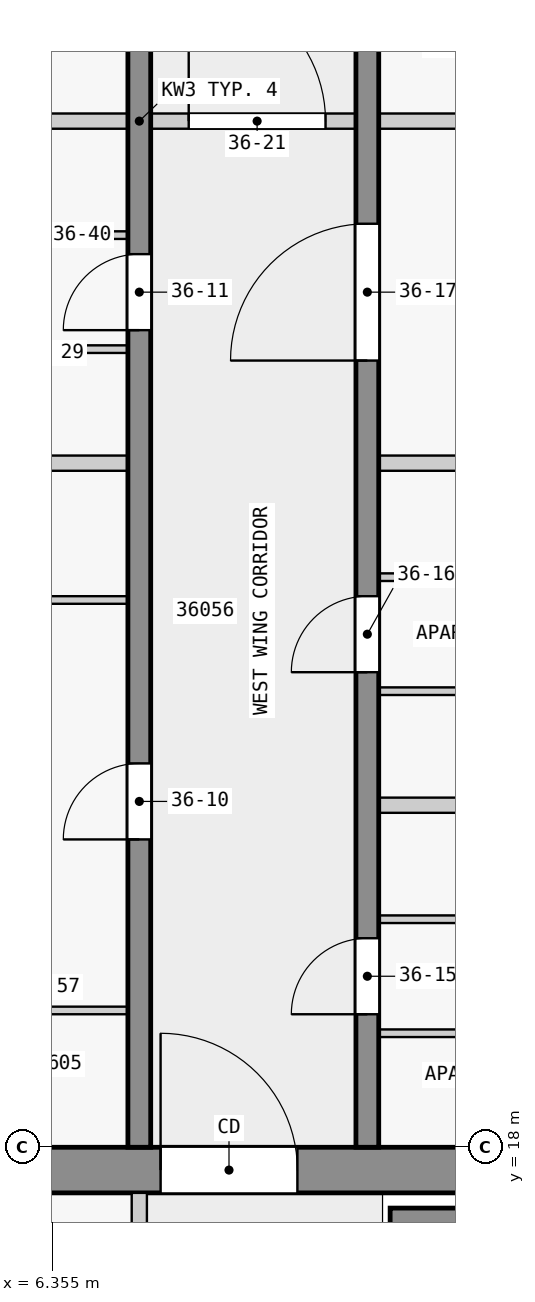
"""IFC4 building model, lengths in metres.
Left out: names, types, materials, properties, quantities, classifications, styles, units other than length and angle.
Written with IfcOpenShell. Run it as: python <this file> out.ifc"""

import sys

from ifc_helpers import new_model, si_unit, direction, frame, frame_2d, origin, place, context, subcontext, project, spatial, rectangle, extrude, element, fill, save


model = new_model("IFC4")
c1 = context("Model", 3, precision=1e-05, world=origin(), true_north=direction((0.0, 1.0)))
c2 = subcontext(c1, "Body", "Model", "MODEL_VIEW")
j1 = project(units=[si_unit("LENGTHUNIT", "METRE"), si_unit("PLANEANGLEUNIT", "RADIAN")], contexts=[c1])
p1 = place(None, origin())
s1 = spatial("IfcSite", under=j1, at=p1, CompositionType="ELEMENT")
p2 = place(p1, origin())
s2 = spatial("IfcBuilding", under=s1, at=p2, CompositionType="ELEMENT")
p3 = place(p2, frame((0.0, 0.0, 142.9)))
s3 = spatial("IfcBuildingStorey", under=s2, at=p3, CompositionType="ELEMENT", Elevation=142.9)
p4 = place(p3, frame((1.38, 17.7, 0.0), z_axis=(0.0, 0.0, 1.0), x_axis=(1.0, 0.0, 0.0)))
e1 = element("IfcWall", 1, at=p4, inside=s3, PredefinedType="SHEAR", context=c2, shape_type="SweptSolid", body=[
    extrude(rectangle(XDim=21.12, YDim=0.6, at=frame_2d((10.56, 0.0))), origin(), (0.0, 0.0, 1.0), 3.25),
])
p5 = place(p4, frame((6.4, 0.0, 0.0)))
e2 = element("IfcOpeningElement", 2, at=p5, cuts=e1, PredefinedType="OPENING", context=c2, shape_type="SweptSolid", body=[
    extrude(rectangle(XDim=1.8, YDim=2.1, at=frame_2d((0.9, 1.05))), frame((0.0, 0.31, 0.0), z_axis=(0.0, -1.0, 0.0), x_axis=(1.0, 0.0, 0.0)), (0.0, 0.0, 1.0), 0.62),
])
p6 = place(p3, frame((10.8, 17.05, 0.0), z_axis=(0.0, 0.0, 1.0), x_axis=(1.0, 0.0, 0.0)))
e3 = element("IfcWall", 3, at=p6, inside=s3, PredefinedType="SHEAR", context=c2, shape_type="SweptSolid", body=[
    extrude(rectangle(XDim=7.8, YDim=0.3, at=frame_2d((3.9, 0.0))), origin(), (0.0, 0.0, 1.0), 3.25),
])
p7 = place(p3, frame((7.5, 18.0, 0.0), z_axis=(0.0, 0.0, 1.0), x_axis=(0.0, 1.0, 0.0)))
e4 = element("IfcWall", 4, at=p7, inside=s3, PredefinedType="SHEAR", context=c2, shape_type="SweptSolid", body=[
    extrude(rectangle(XDim=27.0, YDim=0.3, at=frame_2d((13.5, 0.0))), origin(), (0.0, 0.0, 1.0), 3.25),
])
p8 = place(p7, frame((4.05, 0.0, 0.0)))
e5 = element("IfcOpeningElement", 5, at=p8, cuts=e4, PredefinedType="OPENING", context=c2, shape_type="SweptSolid", body=[
    extrude(rectangle(XDim=1.0, YDim=2.1, at=frame_2d((0.5, 1.05))), frame((0.0, 0.16, 0.0), z_axis=(0.0, -1.0, 0.0), x_axis=(1.0, 0.0, 0.0)), (0.0, 0.0, 1.0), 0.32),
])
p9 = place(p7, frame((10.75, 0.0, 0.0)))
e6 = element("IfcOpeningElement", 6, at=p9, cuts=e4, PredefinedType="OPENING", context=c2, shape_type="SweptSolid", body=[
    extrude(rectangle(XDim=1.0, YDim=2.1, at=frame_2d((0.5, 1.05))), frame((0.0, 0.16, 0.0), z_axis=(0.0, -1.0, 0.0), x_axis=(1.0, 0.0, 0.0)), (0.0, 0.0, 1.0), 0.32),
])
p10 = place(p7, frame((17.55, 0.0, 0.0)))
e7 = element("IfcOpeningElement", 7, at=p10, cuts=e4, PredefinedType="OPENING", context=c2, shape_type="SweptSolid", body=[
    extrude(rectangle(XDim=1.0, YDim=2.1, at=frame_2d((0.5, 1.05))), frame((0.0, 0.16, 0.0), z_axis=(0.0, -1.0, 0.0), x_axis=(1.0, 0.0, 0.0)), (0.0, 0.0, 1.0), 0.32),
])
p11 = place(p7, frame((23.25, 0.0, 0.0)))
e8 = element("IfcOpeningElement", 8, at=p11, cuts=e4, PredefinedType="OPENING", context=c2, shape_type="SweptSolid", body=[
    extrude(rectangle(XDim=0.9, YDim=2.1, at=frame_2d((0.45, 1.05))), frame((0.0, 0.16, 0.0), z_axis=(0.0, -1.0, 0.0), x_axis=(1.0, 0.0, 0.0)), (0.0, 0.0, 1.0), 0.32),
])
p12 = place(p7, frame((25.45, 0.0, 0.0)))
e9 = element("IfcOpeningElement", 9, at=p12, cuts=e4, PredefinedType="OPENING", context=c2, shape_type="SweptSolid", body=[
    extrude(rectangle(XDim=1.0, YDim=2.1, at=frame_2d((0.5, 1.05))), frame((0.0, 0.16, 0.0), z_axis=(0.0, -1.0, 0.0), x_axis=(1.0, 0.0, 0.0)), (0.0, 0.0, 1.0), 0.32),
])
p13 = place(p3, frame((10.5, 18.0, 0.0), z_axis=(0.0, 0.0, 1.0), x_axis=(0.0, 1.0, 0.0)))
e10 = element("IfcWall", 10, at=p13, inside=s3, PredefinedType="SHEAR", context=c2, shape_type="SweptSolid", body=[
    extrude(rectangle(XDim=27.0, YDim=0.3, at=frame_2d((13.5, 0.0))), origin(), (0.0, 0.0, 1.0), 3.25),
])
p14 = place(p13, frame((1.75, 0.0, 0.0)))
e11 = element("IfcOpeningElement", 11, at=p14, cuts=e10, PredefinedType="OPENING", context=c2, shape_type="SweptSolid", body=[
    extrude(rectangle(XDim=1.0, YDim=2.1, at=frame_2d((0.5, 1.05))), frame((0.0, 0.16, 0.0), z_axis=(0.0, -1.0, 0.0), x_axis=(1.0, 0.0, 0.0)), (0.0, 0.0, 1.0), 0.32),
])
p15 = place(p13, frame((6.25, 0.0, 0.0)))
e12 = element("IfcOpeningElement", 12, at=p15, cuts=e10, PredefinedType="OPENING", context=c2, shape_type="SweptSolid", body=[
    extrude(rectangle(XDim=1.0, YDim=2.1, at=frame_2d((0.5, 1.05))), frame((0.0, 0.16, 0.0), z_axis=(0.0, -1.0, 0.0), x_axis=(1.0, 0.0, 0.0)), (0.0, 0.0, 1.0), 0.32),
])
p16 = place(p13, frame((10.35, 0.0, 0.0)))
e13 = element("IfcOpeningElement", 13, at=p16, cuts=e10, PredefinedType="OPENING", context=c2, shape_type="SweptSolid", body=[
    extrude(rectangle(XDim=1.8, YDim=2.1, at=frame_2d((0.9, 1.05))), frame((0.0, 0.16, 0.0), z_axis=(0.0, -1.0, 0.0), x_axis=(1.0, 0.0, 0.0)), (0.0, 0.0, 1.0), 0.32),
])
p17 = place(p13, frame((15.25, 0.0, 0.0)))
e14 = element("IfcOpeningElement", 14, at=p17, cuts=e10, PredefinedType="OPENING", context=c2, shape_type="SweptSolid", body=[
    extrude(rectangle(XDim=1.0, YDim=2.1, at=frame_2d((0.5, 1.05))), frame((0.0, 0.16, 0.0), z_axis=(0.0, -1.0, 0.0), x_axis=(1.0, 0.0, 0.0)), (0.0, 0.0, 1.0), 0.32),
])
p18 = place(p13, frame((21.35, 0.0, 0.0)))
e15 = element("IfcOpeningElement", 15, at=p18, cuts=e10, PredefinedType="OPENING", context=c2, shape_type="SweptSolid", body=[
    extrude(rectangle(XDim=1.0, YDim=2.1, at=frame_2d((0.5, 1.05))), frame((0.0, 0.16, 0.0), z_axis=(0.0, -1.0, 0.0), x_axis=(1.0, 0.0, 0.0)), (0.0, 0.0, 1.0), 0.32),
])
p19 = place(p3, frame((7.5, 10.1, 0.0), z_axis=(0.0, 0.0, 1.0), x_axis=(0.0, 1.0, 0.0)))
e16 = element("IfcWall", 16, at=p19, inside=s3, PredefinedType="PARTITIONING", context=c2, shape_type="SweptSolid", body=[
    extrude(rectangle(XDim=7.3, YDim=0.2, at=frame_2d((3.65, 0.0))), origin(), (0.0, 0.0, 1.0), 3.25),
])
p20 = place(p19, frame((0.75, 0.0, 0.0)))
e17 = element("IfcOpeningElement", 17, at=p20, cuts=e16, PredefinedType="OPENING", context=c2, shape_type="SweptSolid", body=[
    extrude(rectangle(XDim=0.9, YDim=2.1, at=frame_2d((0.45, 1.05))), frame((0.0, 0.11, 0.0), z_axis=(0.0, -1.0, 0.0), x_axis=(1.0, 0.0, 0.0)), (0.0, 0.0, 1.0), 0.22),
])
p21 = place(p19, frame((4.4, 0.0, 0.0)))
e18 = element("IfcOpeningElement", 18, at=p21, cuts=e16, PredefinedType="OPENING", context=c2, shape_type="SweptSolid", body=[
    extrude(rectangle(XDim=0.9, YDim=2.1, at=frame_2d((0.45, 1.05))), frame((0.0, 0.11, 0.0), z_axis=(0.0, -1.0, 0.0), x_axis=(1.0, 0.0, 0.0)), (0.0, 0.0, 1.0), 0.22),
])
p22 = place(p3, frame((14.05, 19.5, 0.0), z_axis=(0.0, 0.0, 1.0), x_axis=(-1.0, 0.0, 0.0)))
e19 = element("IfcWall", 19, at=p22, inside=s3, PredefinedType="PARTITIONING", context=c2, shape_type="SweptSolid", body=[
    extrude(rectangle(XDim=3.4, YDim=0.1, at=frame_2d((1.7, 0.0))), origin(), (0.0, 0.0, 1.0), 3.25),
])
p23 = place(p22, frame((1.25, 0.0, 0.0)))
e20 = element("IfcOpeningElement", 20, at=p23, cuts=e19, PredefinedType="OPENING", context=c2, shape_type="SweptSolid", body=[
    extrude(rectangle(XDim=0.9, YDim=2.1, at=frame_2d((0.45, 1.05))), frame((0.0, 0.06, 0.0), z_axis=(0.0, -1.0, 0.0), x_axis=(1.0, 0.0, 0.0)), (0.0, 0.0, 1.0), 0.12),
])
p24 = place(p3, frame((7.35, 19.8, 0.0), z_axis=(0.0, 0.0, 1.0), x_axis=(-1.0, 0.0, 0.0)))
e21 = element("IfcWall", 21, at=p24, inside=s3, PredefinedType="PARTITIONING", context=c2, shape_type="SweptSolid", body=[
    extrude(rectangle(XDim=3.4, YDim=0.1, at=frame_2d((1.7, 0.0))), origin(), (0.0, 0.0, 1.0), 3.25),
])
p25 = place(p24, frame((1.25, 0.0, 0.0)))
e22 = element("IfcOpeningElement", 22, at=p25, cuts=e21, PredefinedType="OPENING", context=c2, shape_type="SweptSolid", body=[
    extrude(rectangle(XDim=0.9, YDim=2.1, at=frame_2d((0.45, 1.05))), frame((0.0, 0.06, 0.0), z_axis=(0.0, -1.0, 0.0), x_axis=(1.0, 0.0, 0.0)), (0.0, 0.0, 1.0), 0.12),
])
p26 = place(p3, frame((10.65, 21.0, 0.0), z_axis=(0.0, 0.0, 1.0), x_axis=(1.0, 0.0, 0.0)))
e23 = element("IfcWall", 23, at=p26, inside=s3, PredefinedType="PARTITIONING", context=c2, shape_type="SweptSolid", body=[
    extrude(rectangle(XDim=3.4, YDim=0.1, at=frame_2d((1.7, 0.0))), origin(), (0.0, 0.0, 1.0), 3.25),
])
p27 = place(p26, frame((1.25, 0.0, 0.0)))
e24 = element("IfcOpeningElement", 24, at=p27, cuts=e23, PredefinedType="OPENING", context=c2, shape_type="SweptSolid", body=[
    extrude(rectangle(XDim=0.9, YDim=2.1, at=frame_2d((0.45, 1.05))), frame((0.0, 0.06, 0.0), z_axis=(0.0, -1.0, 0.0), x_axis=(1.0, 0.0, 0.0)), (0.0, 0.0, 1.0), 0.12),
])
p28 = place(p3, frame((13.95, 22.5, 0.0), z_axis=(0.0, 0.0, 1.0), x_axis=(-1.0, 0.0, 0.0)))
e25 = element("IfcWall", 25, at=p28, inside=s3, PredefinedType="PARTITIONING", context=c2, shape_type="SweptSolid", body=[
    extrude(rectangle(XDim=3.3, YDim=0.2, at=frame_2d((1.65, 0.0))), origin(), (0.0, 0.0, 1.0), 3.25),
])
p29 = place(p3, frame((14.05, 24.0, 0.0), z_axis=(0.0, 0.0, 1.0), x_axis=(-1.0, 0.0, 0.0)))
e26 = element("IfcWall", 26, at=p29, inside=s3, PredefinedType="PARTITIONING", context=c2, shape_type="SweptSolid", body=[
    extrude(rectangle(XDim=3.4, YDim=0.1, at=frame_2d((1.7, 0.0))), origin(), (0.0, 0.0, 1.0), 3.25),
])
p30 = place(p29, frame((1.25, 0.0, 0.0)))
e27 = element("IfcOpeningElement", 27, at=p30, cuts=e26, PredefinedType="OPENING", context=c2, shape_type="SweptSolid", body=[
    extrude(rectangle(XDim=0.9, YDim=2.1, at=frame_2d((0.45, 1.05))), frame((0.0, 0.06, 0.0), z_axis=(0.0, -1.0, 0.0), x_axis=(1.0, 0.0, 0.0)), (0.0, 0.0, 1.0), 0.12),
])
p31 = place(p3, frame((3.95, 25.2, 0.0), z_axis=(0.0, 0.0, 1.0), x_axis=(1.0, 0.0, 0.0)))
e28 = element("IfcWall", 28, at=p31, inside=s3, PredefinedType="PARTITIONING", context=c2, shape_type="SweptSolid", body=[
    extrude(rectangle(XDim=3.4, YDim=0.1, at=frame_2d((1.7, 0.0))), origin(), (0.0, 0.0, 1.0), 3.25),
])
p32 = place(p31, frame((1.25, 0.0, 0.0)))
e29 = element("IfcOpeningElement", 29, at=p32, cuts=e28, PredefinedType="OPENING", context=c2, shape_type="SweptSolid", body=[
    extrude(rectangle(XDim=0.9, YDim=2.1, at=frame_2d((0.45, 1.05))), frame((0.0, 0.06, 0.0), z_axis=(0.0, -1.0, 0.0), x_axis=(1.0, 0.0, 0.0)), (0.0, 0.0, 1.0), 0.12),
])
p33 = place(p3, frame((10.65, 25.5, 0.0), z_axis=(0.0, 0.0, 1.0), x_axis=(1.0, 0.0, 0.0)))
e30 = element("IfcWall", 30, at=p33, inside=s3, PredefinedType="PARTITIONING", context=c2, shape_type="SweptSolid", body=[
    extrude(rectangle(XDim=3.4, YDim=0.1, at=frame_2d((1.7, 0.0))), origin(), (0.0, 0.0, 1.0), 3.25),
])
p34 = place(p33, frame((1.25, 0.0, 0.0)))
e31 = element("IfcOpeningElement", 31, at=p34, cuts=e30, PredefinedType="OPENING", context=c2, shape_type="SweptSolid", body=[
    extrude(rectangle(XDim=0.9, YDim=2.1, at=frame_2d((0.45, 1.05))), frame((0.0, 0.06, 0.0), z_axis=(0.0, -1.0, 0.0), x_axis=(1.0, 0.0, 0.0)), (0.0, 0.0, 1.0), 0.12),
])
for number, where, z_axis, x_axis in (
    (32, (7.35, 27.0, 0.0), (0.0, 0.0, 1.0), (-1.0, 0.0, 0.0)),
    (33, (13.95, 27.0, 0.0), (0.0, 0.0, 1.0), (-1.0, 0.0, 0.0)),
):
    element("IfcWall", number, at=place(p3, frame(where, z_axis=z_axis, x_axis=x_axis)), inside=s3, PredefinedType="PARTITIONING", context=c2, shape_type="SweptSolid", body=[
        extrude(rectangle(XDim=3.3, YDim=0.2, at=frame_2d((1.65, 0.0))), origin(), (0.0, 0.0, 1.0), 3.25),
    ])
p35 = place(p3, frame((7.35, 28.5, 0.0), z_axis=(0.0, 0.0, 1.0), x_axis=(-1.0, 0.0, 0.0)))
e34 = element("IfcWall", 34, at=p35, inside=s3, PredefinedType="PARTITIONING", context=c2, shape_type="SweptSolid", body=[
    extrude(rectangle(XDim=3.4, YDim=0.1, at=frame_2d((1.7, 0.0))), origin(), (0.0, 0.0, 1.0), 3.25),
])
p36 = place(p35, frame((1.25, 0.0, 0.0)))
e35 = element("IfcOpeningElement", 35, at=p36, cuts=e34, PredefinedType="OPENING", context=c2, shape_type="SweptSolid", body=[
    extrude(rectangle(XDim=0.9, YDim=2.1, at=frame_2d((0.45, 1.05))), frame((0.0, 0.06, 0.0), z_axis=(0.0, -1.0, 0.0), x_axis=(1.0, 0.0, 0.0)), (0.0, 0.0, 1.0), 0.12),
])
p37 = place(p3, frame((3.95, 30.0, 0.0), z_axis=(0.0, 0.0, 1.0), x_axis=(1.0, 0.0, 0.0)))
e36 = element("IfcWall", 36, at=p37, inside=s3, PredefinedType="PARTITIONING", context=c2, shape_type="SweptSolid", body=[
    extrude(rectangle(XDim=3.4, YDim=0.1, at=frame_2d((1.7, 0.0))), origin(), (0.0, 0.0, 1.0), 3.25),
])
p38 = place(p37, frame((1.25, 0.0, 0.0)))
e37 = element("IfcOpeningElement", 37, at=p38, cuts=e36, PredefinedType="OPENING", context=c2, shape_type="SweptSolid", body=[
    extrude(rectangle(XDim=0.9, YDim=2.1, at=frame_2d((0.45, 1.05))), frame((0.0, 0.06, 0.0), z_axis=(0.0, -1.0, 0.0), x_axis=(1.0, 0.0, 0.0)), (0.0, 0.0, 1.0), 0.12),
])
p39 = place(p3, frame((7.35, 31.5, 0.0), z_axis=(0.0, 0.0, 1.0), x_axis=(-1.0, 0.0, 0.0)))
e38 = element("IfcWall", 38, at=p39, inside=s3, PredefinedType="PARTITIONING", context=c2, shape_type="SweptSolid", body=[
    extrude(rectangle(XDim=3.3, YDim=0.2, at=frame_2d((1.65, 0.0))), origin(), (0.0, 0.0, 1.0), 3.25),
])
p40 = place(p3, frame((17.85, 31.5, 0.0), z_axis=(0.0, 0.0, 1.0), x_axis=(-1.0, 0.0, 0.0)))
e39 = element("IfcWall", 39, at=p40, inside=s3, PredefinedType="PARTITIONING", context=c2, shape_type="SweptSolid", body=[
    extrude(rectangle(XDim=7.2, YDim=0.2, at=frame_2d((3.6, 0.0))), origin(), (0.0, 0.0, 1.0), 3.25),
])
p41 = place(p3, frame((7.45, 31.5, 0.0), z_axis=(0.0, 0.0, 1.0), x_axis=(1.0, 0.0, 0.0)))
e40 = element("IfcWall", 40, at=p41, inside=s3, PredefinedType="PARTITIONING", context=c2, shape_type="SweptSolid", body=[
    extrude(rectangle(XDim=3.1, YDim=0.2, at=frame_2d((1.55, 0.0))), origin(), (0.0, 0.0, 1.0), 3.25),
])
p42 = place(p41, frame((0.7, 0.0, 0.0)))
e41 = element("IfcOpeningElement", 41, at=p42, cuts=e40, PredefinedType="OPENING", context=c2, shape_type="SweptSolid", body=[
    extrude(rectangle(XDim=1.8, YDim=2.1, at=frame_2d((0.9, 1.05))), frame((0.0, 0.11, 0.0), z_axis=(0.0, -1.0, 0.0), x_axis=(1.0, 0.0, 0.0)), (0.0, 0.0, 1.0), 0.22),
])
p43 = place(p5, origin())
e42 = element("IfcDoor", 42, at=p43, inside=s3, OperationType="DOUBLE_DOOR_SINGLE_SWING", PredefinedType="DOOR", context=c2, shape_type="SweptSolid", body=[
    extrude(rectangle(XDim=1.8, YDim=2.1, at=frame_2d((0.9, 1.05))), frame((0.0, 0.025, 0.0), z_axis=(0.0, -1.0, 0.0), x_axis=(1.0, 0.0, 0.0)), (0.0, 0.0, 1.0), 0.05),
])
fill(e2, e42)
p44 = place(p8, origin())
e43 = element("IfcDoor", 43, at=p44, inside=s3, OperationType="SINGLE_SWING_LEFT", PredefinedType="DOOR", context=c2, shape_type="SweptSolid", body=[
    extrude(rectangle(XDim=1.0, YDim=2.1, at=frame_2d((0.5, 1.05))), frame((0.0, 0.025, 0.0), z_axis=(0.0, -1.0, 0.0), x_axis=(1.0, 0.0, 0.0)), (0.0, 0.0, 1.0), 0.05),
])
fill(e5, e43)
p45 = place(p9, origin())
e44 = element("IfcDoor", 44, at=p45, inside=s3, OperationType="SINGLE_SWING_LEFT", PredefinedType="DOOR", context=c2, shape_type="SweptSolid", body=[
    extrude(rectangle(XDim=1.0, YDim=2.1, at=frame_2d((0.5, 1.05))), frame((0.0, 0.025, 0.0), z_axis=(0.0, -1.0, 0.0), x_axis=(1.0, 0.0, 0.0)), (0.0, 0.0, 1.0), 0.05),
])
fill(e6, e44)
p46 = place(p14, origin())
e45 = element("IfcDoor", 45, at=p46, inside=s3, OperationType="SINGLE_SWING_LEFT", PredefinedType="DOOR", context=c2, shape_type="SweptSolid", body=[
    extrude(rectangle(XDim=1.0, YDim=2.1, at=frame_2d((0.5, 1.05))), frame((0.0, 0.025, 0.0), z_axis=(0.0, -1.0, 0.0), x_axis=(1.0, 0.0, 0.0)), (0.0, 0.0, 1.0), 0.05),
])
fill(e11, e45)
p47 = place(p15, origin())
e46 = element("IfcDoor", 46, at=p47, inside=s3, OperationType="SINGLE_SWING_LEFT", PredefinedType="DOOR", context=c2, shape_type="SweptSolid", body=[
    extrude(rectangle(XDim=1.0, YDim=2.1, at=frame_2d((0.5, 1.05))), frame((0.0, 0.025, 0.0), z_axis=(0.0, -1.0, 0.0), x_axis=(1.0, 0.0, 0.0)), (0.0, 0.0, 1.0), 0.05),
])
fill(e12, e46)
p48 = place(p16, origin())
e47 = element("IfcDoor", 47, at=p48, inside=s3, OperationType="SINGLE_SWING_LEFT", PredefinedType="DOOR", context=c2, shape_type="SweptSolid", body=[
    extrude(rectangle(XDim=1.8, YDim=2.1, at=frame_2d((0.9, 1.05))), frame((0.0, 0.025, 0.0), z_axis=(0.0, -1.0, 0.0), x_axis=(1.0, 0.0, 0.0)), (0.0, 0.0, 1.0), 0.05),
])
fill(e13, e47)
p49 = place(p42, origin())
e48 = element("IfcDoor", 48, at=p49, inside=s3, OperationType="SINGLE_SWING_RIGHT", PredefinedType="DOOR", context=c2, shape_type="SweptSolid", body=[
    extrude(rectangle(XDim=1.8, YDim=2.1, at=frame_2d((0.9, 1.05))), frame((0.0, 0.025, 0.0), z_axis=(0.0, -1.0, 0.0), x_axis=(1.0, 0.0, 0.0)), (0.0, 0.0, 1.0), 0.05),
])
fill(e41, e48)
save(model, sys.argv[1])
